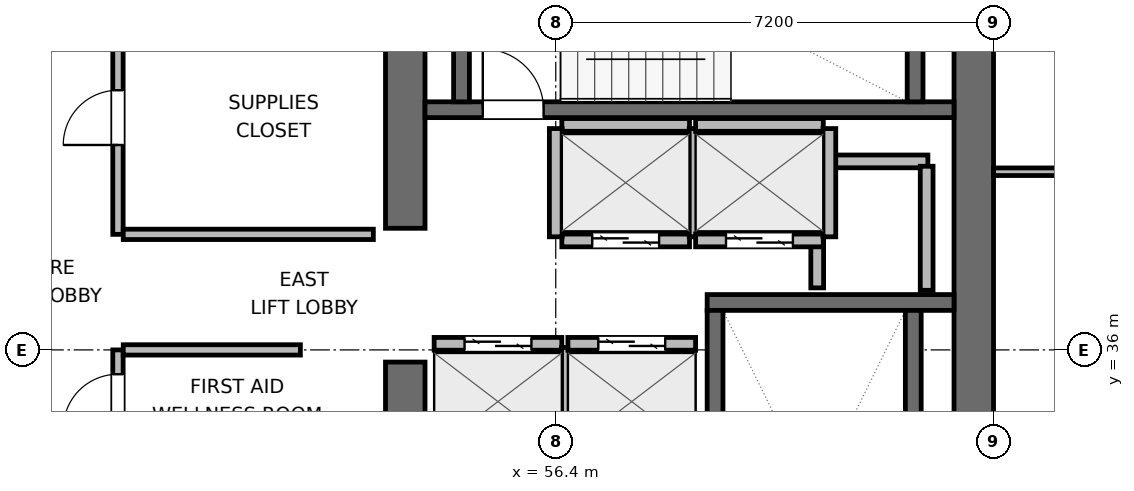
"""IFC4 building model, lengths in metres.
Left out: names, types, materials, properties, quantities, classifications, styles, units other than length and angle.
Written with IfcOpenShell. Run it as: python <this file> out.ifc"""

import sys

from ifc_helpers import new_model, si_unit, direction, frame, frame_2d, origin, place, context, subcontext, project, spatial, rectangle, extrude, element, fill, save


model = new_model("IFC4")
c1 = context("Model", 3, precision=1e-05, world=origin(), true_north=direction((0.0, 1.0)))
c2 = subcontext(c1, "Body", "Model", "MODEL_VIEW")
j1 = project(units=[si_unit("LENGTHUNIT", "METRE"), si_unit("PLANEANGLEUNIT", "RADIAN")], contexts=[c1])
p1 = place(None, origin())
s1 = spatial("IfcSite", under=j1, at=p1, CompositionType="ELEMENT")
p2 = place(p1, origin())
s2 = spatial("IfcBuilding", under=s1, at=p2, CompositionType="ELEMENT")
p3 = place(p2, frame((0.0, 0.0, 231.0)))
s3 = spatial("IfcBuildingStorey", under=s2, at=p3, CompositionType="ELEMENT", Elevation=231.0)
p4 = place(p3, frame((53.925, 27.925, 0.0), z_axis=(0.0, 0.0, 1.0), x_axis=(0.0, 1.0, 0.0)))
e1 = element("IfcWall", 1, at=p4, inside=s3, PredefinedType="SHEAR", context=c2, shape_type="SweptSolid", body=[
    extrude(rectangle(XDim=7.875, YDim=0.65, at=frame_2d((3.938, 0.0))), origin(), (0.0, 0.0, 1.0), 3.9),
])
p5 = place(p3, frame((53.925, 38.0, 0.0), z_axis=(0.0, 0.0, 1.0), x_axis=(0.0, 1.0, 0.0)))
e2 = element("IfcWall", 2, at=p5, inside=s3, PredefinedType="SHEAR", context=c2, shape_type="SweptSolid", body=[
    extrude(rectangle(XDim=6.075, YDim=0.65, at=frame_2d((3.038, 0.0))), origin(), (0.0, 0.0, 1.0), 3.9),
])
p6 = place(p3, frame((63.275, 27.6, 0.0), z_axis=(0.0, 0.0, 1.0), x_axis=(0.0, 1.0, 0.0)))
e3 = element("IfcWall", 3, at=p6, inside=s3, PredefinedType="SHEAR", context=c2, shape_type="SweptSolid", body=[
    extrude(rectangle(XDim=16.8, YDim=0.65, at=frame_2d((8.4, 0.0))), origin(), (0.0, 0.0, 1.0), 3.9),
])
p7 = place(p3, frame((58.89, 36.78, 0.0), z_axis=(0.0, 0.0, 1.0), x_axis=(1.0, 0.0, 0.0)))
e4 = element("IfcWall", 4, at=p7, inside=s3, PredefinedType="SHEAR", context=c2, shape_type="SweptSolid", body=[
    extrude(rectangle(XDim=4.06, YDim=0.26, at=frame_2d((2.03, 0.0))), origin(), (0.0, 0.0, 1.0), 3.9),
])
p8 = place(p3, frame((59.02, 29.05, 0.0), z_axis=(0.0, 0.0, 1.0), x_axis=(0.0, 1.0, 0.0)))
e5 = element("IfcWall", 5, at=p8, inside=s3, PredefinedType="SHEAR", context=c2, shape_type="SweptSolid", body=[
    extrude(rectangle(XDim=7.6, YDim=0.26, at=frame_2d((3.8, 0.0))), origin(), (0.0, 0.0, 1.0), 3.9),
])
p9 = place(p8, frame((0.3, 0.0, 0.0)))
e6 = element("IfcOpeningElement", 6, at=p9, cuts=e5, PredefinedType="OPENING", context=c2, shape_type="SweptSolid", body=[
    extrude(rectangle(XDim=1.0, YDim=2.04, at=frame_2d((0.5, 1.02))), frame((0.0, 0.14, 0.0), z_axis=(0.0, -1.0, 0.0), x_axis=(1.0, 0.0, 0.0)), (0.0, 0.0, 1.0), 0.28),
])
p10 = place(p3, frame((62.28, 29.05, 0.0), z_axis=(0.0, 0.0, 1.0), x_axis=(0.0, 1.0, 0.0)))
e7 = element("IfcWall", 7, at=p10, inside=s3, PredefinedType="SHEAR", context=c2, shape_type="SweptSolid", body=[
    extrude(rectangle(XDim=7.6, YDim=0.26, at=frame_2d((3.8, 0.0))), origin(), (0.0, 0.0, 1.0), 3.9),
])
p11 = place(p3, frame((54.25, 39.95, 0.0), z_axis=(0.0, 0.0, 1.0), x_axis=(1.0, 0.0, 0.0)))
e8 = element("IfcWall", 8, at=p11, inside=s3, PredefinedType="SHEAR", context=c2, shape_type="SweptSolid", body=[
    extrude(rectangle(XDim=8.7, YDim=0.26, at=frame_2d((4.35, 0.0))), origin(), (0.0, 0.0, 1.0), 3.9),
])
p12 = place(p11, frame((0.95, 0.0, 0.0)))
e9 = element("IfcOpeningElement", 9, at=p12, cuts=e8, PredefinedType="OPENING", context=c2, shape_type="SweptSolid", body=[
    extrude(rectangle(XDim=1.0, YDim=2.04, at=frame_2d((0.5, 1.02))), frame((0.0, 0.14, 0.0), z_axis=(0.0, -1.0, 0.0), x_axis=(1.0, 0.0, 0.0)), (0.0, 0.0, 1.0), 0.28),
])
for number, where, z_axis, x_axis in (
    (10, (54.85, 40.08, 0.0), (0.0, 0.0, 1.0), (0.0, 1.0, 0.0)),
    (11, (62.31, 40.08, 0.0), (0.0, 0.0, 1.0), (0.0, 1.0, 0.0)),
):
    element("IfcWall", number, at=place(p3, frame(where, z_axis=z_axis, x_axis=x_axis)), inside=s3, PredefinedType="SHEAR", context=c2, shape_type="SweptSolid", body=[
        extrude(rectangle(XDim=2.94, YDim=0.26, at=frame_2d((1.47, 0.0))), origin(), (0.0, 0.0, 1.0), 3.9),
    ])
p13 = place(p3, frame((60.72, 39.1, 0.0), z_axis=(0.0, 0.0, 1.0), x_axis=(1.0, 0.0, 0.0)))
e12 = element("IfcWall", 12, at=p13, inside=s3, PredefinedType="PARTITIONING", context=c2, shape_type="SweptSolid", body=[
    extrude(rectangle(XDim=1.8, YDim=0.21, at=frame_2d((0.9, 0.0))), origin(), (0.0, 0.0, 1.0), 3.68),
])
p14 = place(p3, frame((60.7, 37.02, 0.0), z_axis=(0.0, 0.0, 1.0), x_axis=(0.0, 1.0, 0.0)))
e13 = element("IfcWall", 13, at=p14, inside=s3, PredefinedType="PARTITIONING", context=c2, shape_type="SweptSolid", body=[
    extrude(rectangle(XDim=1.96, YDim=0.21, at=frame_2d((0.98, 0.0))), origin(), (0.0, 0.0, 1.0), 3.68),
])
p15 = place(p3, frame((62.5, 36.98, 0.0), z_axis=(0.0, 0.0, 1.0), x_axis=(0.0, 1.0, 0.0)))
e14 = element("IfcWall", 14, at=p15, inside=s3, PredefinedType="PARTITIONING", context=c2, shape_type="SweptSolid", body=[
    extrude(rectangle(XDim=2.04, YDim=0.21, at=frame_2d((1.02, 0.0))), origin(), (0.0, 0.0, 1.0), 3.68),
])
p16 = place(p3, frame((54.4, 36.1, 0.0), z_axis=(0.0, 0.0, 1.0), x_axis=(1.0, 0.0, 0.0)))
e15 = element("IfcWall", 15, at=p16, inside=s3, PredefinedType="PARTITIONING", context=c2, shape_type="SweptSolid", body=[
    extrude(rectangle(XDim=2.1, YDim=0.21, at=frame_2d((1.05, 0.0))), origin(), (0.0, 0.0, 1.0), 3.68),
])
p17 = place(p16, frame((0.5, 0.0, 0.0)))
e16 = element("IfcOpeningElement", 16, at=p17, cuts=e15, PredefinedType="OPENING", context=c2, shape_type="SweptSolid", body=[
    extrude(rectangle(XDim=1.1, YDim=2.04, at=frame_2d((0.55, 1.02))), frame((0.0, 0.115, 0.0), z_axis=(0.0, -1.0, 0.0), x_axis=(1.0, 0.0, 0.0)), (0.0, 0.0, 1.0), 0.23),
])
p18 = place(p3, frame((56.6, 34.26, 0.0), z_axis=(0.0, 0.0, 1.0), x_axis=(0.0, 1.0, 0.0)))
e17 = element("IfcWall", 17, at=p18, inside=s3, PredefinedType="PARTITIONING", context=c2, shape_type="SweptSolid", body=[
    extrude(rectangle(XDim=1.78, YDim=0.21, at=frame_2d((0.89, 0.0))), origin(), (0.0, 0.0, 1.0), 3.68),
])
p19 = place(p3, frame((56.6, 36.1, 0.0), z_axis=(0.0, 0.0, 1.0), x_axis=(1.0, 0.0, 0.0)))
e18 = element("IfcWall", 18, at=p19, inside=s3, PredefinedType="PARTITIONING", context=c2, shape_type="SweptSolid", body=[
    extrude(rectangle(XDim=2.1, YDim=0.21, at=frame_2d((1.05, 0.0))), origin(), (0.0, 0.0, 1.0), 3.68),
])
p20 = place(p19, frame((0.5, 0.0, 0.0)))
e19 = element("IfcOpeningElement", 19, at=p20, cuts=e18, PredefinedType="OPENING", context=c2, shape_type="SweptSolid", body=[
    extrude(rectangle(XDim=1.1, YDim=2.04, at=frame_2d((0.55, 1.02))), frame((0.0, 0.115, 0.0), z_axis=(0.0, -1.0, 0.0), x_axis=(1.0, 0.0, 0.0)), (0.0, 0.0, 1.0), 0.23),
])
p21 = place(p3, frame((56.5, 37.8, 0.0), z_axis=(0.0, 0.0, 1.0), x_axis=(1.0, 0.0, 0.0)))
e20 = element("IfcWall", 20, at=p21, inside=s3, PredefinedType="PARTITIONING", context=c2, shape_type="SweptSolid", body=[
    extrude(rectangle(XDim=2.1, YDim=0.21, at=frame_2d((1.05, 0.0))), origin(), (0.0, 0.0, 1.0), 3.68),
])
p22 = place(p21, frame((0.5, 0.0, 0.0)))
e21 = element("IfcOpeningElement", 21, at=p22, cuts=e20, PredefinedType="OPENING", context=c2, shape_type="SweptSolid", body=[
    extrude(rectangle(XDim=1.1, YDim=2.04, at=frame_2d((0.55, 1.02))), frame((0.0, 0.115, 0.0), z_axis=(0.0, -1.0, 0.0), x_axis=(1.0, 0.0, 0.0)), (0.0, 0.0, 1.0), 0.23),
])
p23 = place(p3, frame((56.5, 39.7, 0.0), z_axis=(0.0, 0.0, 1.0), x_axis=(1.0, 0.0, 0.0)))
e22 = element("IfcWall", 22, at=p23, inside=s3, PredefinedType="PARTITIONING", context=c2, shape_type="SweptSolid", body=[
    extrude(rectangle(XDim=2.1, YDim=0.21, at=frame_2d((1.05, 0.0))), origin(), (0.0, 0.0, 1.0), 3.68),
])
for number, where, z_axis, x_axis in (
    (23, (56.4, 37.86, 0.0), (0.0, 0.0, 1.0), (0.0, 1.0, 0.0)),
    (24, (58.7, 37.86, 0.0), (0.0, 0.0, 1.0), (0.0, 1.0, 0.0)),
):
    element("IfcWall", number, at=place(p3, frame(where, z_axis=z_axis, x_axis=x_axis)), inside=s3, PredefinedType="PARTITIONING", context=c2, shape_type="SweptSolid", body=[
        extrude(rectangle(XDim=1.78, YDim=0.21, at=frame_2d((0.89, 0.0))), origin(), (0.0, 0.0, 1.0), 3.68),
    ])
p24 = place(p3, frame((58.7, 37.8, 0.0), z_axis=(0.0, 0.0, 1.0), x_axis=(1.0, 0.0, 0.0)))
e25 = element("IfcWall", 25, at=p24, inside=s3, PredefinedType="PARTITIONING", context=c2, shape_type="SweptSolid", body=[
    extrude(rectangle(XDim=2.1, YDim=0.21, at=frame_2d((1.05, 0.0))), origin(), (0.0, 0.0, 1.0), 3.68),
])
p25 = place(p24, frame((0.5, 0.0, 0.0)))
e26 = element("IfcOpeningElement", 26, at=p25, cuts=e25, PredefinedType="OPENING", context=c2, shape_type="SweptSolid", body=[
    extrude(rectangle(XDim=1.1, YDim=2.04, at=frame_2d((0.55, 1.02))), frame((0.0, 0.115, 0.0), z_axis=(0.0, -1.0, 0.0), x_axis=(1.0, 0.0, 0.0)), (0.0, 0.0, 1.0), 0.23),
])
p26 = place(p3, frame((58.7, 39.7, 0.0), z_axis=(0.0, 0.0, 1.0), x_axis=(1.0, 0.0, 0.0)))
e27 = element("IfcWall", 27, at=p26, inside=s3, PredefinedType="PARTITIONING", context=c2, shape_type="SweptSolid", body=[
    extrude(rectangle(XDim=2.1, YDim=0.21, at=frame_2d((1.05, 0.0))), origin(), (0.0, 0.0, 1.0), 3.68),
])
p27 = place(p3, frame((60.9, 37.86, 0.0), z_axis=(0.0, 0.0, 1.0), x_axis=(0.0, 1.0, 0.0)))
e28 = element("IfcWall", 28, at=p27, inside=s3, PredefinedType="PARTITIONING", context=c2, shape_type="SweptSolid", body=[
    extrude(rectangle(XDim=1.78, YDim=0.21, at=frame_2d((0.89, 0.0))), origin(), (0.0, 0.0, 1.0), 3.68),
])
p28 = place(p3, frame((49.2, 32.6, 0.0), z_axis=(0.0, 0.0, 1.0), x_axis=(0.0, 1.0, 0.0)))
e29 = element("IfcWall", 29, at=p28, inside=s3, PredefinedType="PARTITIONING", context=c2, shape_type="SweptSolid", body=[
    extrude(rectangle(XDim=3.4, YDim=0.17, at=frame_2d((1.7, 0.0))), origin(), (0.0, 0.0, 1.0), 3.68),
])
p29 = place(p28, frame((0.4, 0.0, 0.0)))
e30 = element("IfcOpeningElement", 30, at=p29, cuts=e29, PredefinedType="OPENING", context=c2, shape_type="SweptSolid", body=[
    extrude(rectangle(XDim=0.9, YDim=2.02, at=frame_2d((0.45, 1.01))), frame((0.0, 0.095, 0.0), z_axis=(0.0, -1.0, 0.0), x_axis=(1.0, 0.0, 0.0)), (0.0, 0.0, 1.0), 0.19),
])
p30 = place(p28, frame((2.1, 0.0, 0.0)))
e31 = element("IfcOpeningElement", 31, at=p30, cuts=e29, PredefinedType="OPENING", context=c2, shape_type="SweptSolid", body=[
    extrude(rectangle(XDim=0.9, YDim=2.02, at=frame_2d((0.45, 1.01))), frame((0.0, 0.095, 0.0), z_axis=(0.0, -1.0, 0.0), x_axis=(1.0, 0.0, 0.0)), (0.0, 0.0, 1.0), 0.19),
])
p31 = place(p3, frame((49.287, 36.0, 0.0), z_axis=(0.0, 0.0, 1.0), x_axis=(1.0, 0.0, 0.0)))
e32 = element("IfcWall", 32, at=p31, inside=s3, PredefinedType="PARTITIONING", context=c2, shape_type="SweptSolid", body=[
    extrude(rectangle(XDim=2.913, YDim=0.17, at=frame_2d((1.457, 0.0))), origin(), (0.0, 0.0, 1.0), 3.68),
])
p32 = place(p3, frame((49.2, 37.9, 0.0), z_axis=(0.0, 0.0, 1.0), x_axis=(0.0, 1.0, 0.0)))
e33 = element("IfcWall", 33, at=p32, inside=s3, PredefinedType="PARTITIONING", context=c2, shape_type="SweptSolid", body=[
    extrude(rectangle(XDim=6.0, YDim=0.17, at=frame_2d((3.0, 0.0))), origin(), (0.0, 0.0, 1.0), 3.68),
])
p33 = place(p32, frame((1.47, 0.0, 0.0)))
e34 = element("IfcOpeningElement", 34, at=p33, cuts=e33, PredefinedType="OPENING", context=c2, shape_type="SweptSolid", body=[
    extrude(rectangle(XDim=0.9, YDim=2.02, at=frame_2d((0.45, 1.01))), frame((0.0, 0.095, 0.0), z_axis=(0.0, -1.0, 0.0), x_axis=(1.0, 0.0, 0.0)), (0.0, 0.0, 1.0), 0.19),
])
p34 = place(p32, frame((4.47, 0.0, 0.0)))
e35 = element("IfcOpeningElement", 35, at=p34, cuts=e33, PredefinedType="OPENING", context=c2, shape_type="SweptSolid", body=[
    extrude(rectangle(XDim=0.9, YDim=2.02, at=frame_2d((0.45, 1.01))), frame((0.0, 0.095, 0.0), z_axis=(0.0, -1.0, 0.0), x_axis=(1.0, 0.0, 0.0)), (0.0, 0.0, 1.0), 0.19),
])
p35 = place(p3, frame((49.287, 37.9, 0.0), z_axis=(0.0, 0.0, 1.0), x_axis=(1.0, 0.0, 0.0)))
e36 = element("IfcWall", 36, at=p35, inside=s3, PredefinedType="PARTITIONING", context=c2, shape_type="SweptSolid", body=[
    extrude(rectangle(XDim=4.113, YDim=0.17, at=frame_2d((2.056, 0.0))), origin(), (0.0, 0.0, 1.0), 3.68),
])
p36 = place(p3, frame((63.6, 38.93, 0.0), z_axis=(0.0, 0.0, 1.0), x_axis=(1.0, 0.0, 0.0)))
e37 = element("IfcWall", 37, at=p36, inside=s3, PredefinedType="PARTITIONING", context=c2, shape_type="SweptSolid", body=[
    extrude(rectangle(XDim=4.845, YDim=0.125, at=frame_2d((2.422, 0.0))), origin(), (0.0, 0.0, 1.0), 3.68),
])
p37 = place(p36, frame((2.1, 0.0, 0.0)))
e38 = element("IfcOpeningElement", 38, at=p37, cuts=e37, PredefinedType="OPENING", context=c2, shape_type="SweptSolid", body=[
    extrude(rectangle(XDim=0.9, YDim=2.02, at=frame_2d((0.45, 1.01))), frame((0.0, 0.073, 0.0), z_axis=(0.0, -1.0, 0.0), x_axis=(1.0, 0.0, 0.0)), (0.0, 0.0, 1.0), 0.145),
])
p38 = place(p12, origin())
e39 = element("IfcDoor", 39, at=p38, inside=s3, OperationType="SINGLE_SWING_LEFT", PredefinedType="DOOR", context=c2, shape_type="SweptSolid", body=[
    extrude(rectangle(XDim=1.0, YDim=2.04, at=frame_2d((0.5, 1.02))), frame((0.0, 0.025, 0.0), z_axis=(0.0, -1.0, 0.0), x_axis=(1.0, 0.0, 0.0)), (0.0, 0.0, 1.0), 0.05),
])
fill(e9, e39)
p39 = place(p17, origin())
e40 = element("IfcDoor", 40, at=p39, inside=s3, OperationType="DOUBLE_DOOR_SLIDING", PredefinedType="DOOR", context=c2, shape_type="SweptSolid", body=[
    extrude(rectangle(XDim=1.1, YDim=2.04, at=frame_2d((0.55, 1.02))), frame((0.0, 0.025, 0.0), z_axis=(0.0, -1.0, 0.0), x_axis=(1.0, 0.0, 0.0)), (0.0, 0.0, 1.0), 0.05),
])
fill(e16, e40)
p40 = place(p20, origin())
e41 = element("IfcDoor", 41, at=p40, inside=s3, OperationType="DOUBLE_DOOR_SLIDING", PredefinedType="DOOR", context=c2, shape_type="SweptSolid", body=[
    extrude(rectangle(XDim=1.1, YDim=2.04, at=frame_2d((0.55, 1.02))), frame((0.0, 0.025, 0.0), z_axis=(0.0, -1.0, 0.0), x_axis=(1.0, 0.0, 0.0)), (0.0, 0.0, 1.0), 0.05),
])
fill(e19, e41)
p41 = place(p22, origin())
e42 = element("IfcDoor", 42, at=p41, inside=s3, OperationType="DOUBLE_DOOR_SLIDING", PredefinedType="DOOR", context=c2, shape_type="SweptSolid", body=[
    extrude(rectangle(XDim=1.1, YDim=2.04, at=frame_2d((0.55, 1.02))), frame((0.0, 0.025, 0.0), z_axis=(0.0, -1.0, 0.0), x_axis=(1.0, 0.0, 0.0)), (0.0, 0.0, 1.0), 0.05),
])
fill(e21, e42)
p42 = place(p25, origin())
e43 = element("IfcDoor", 43, at=p42, inside=s3, OperationType="DOUBLE_DOOR_SLIDING", PredefinedType="DOOR", context=c2, shape_type="SweptSolid", body=[
    extrude(rectangle(XDim=1.1, YDim=2.04, at=frame_2d((0.55, 1.02))), frame((0.0, 0.025, 0.0), z_axis=(0.0, -1.0, 0.0), x_axis=(1.0, 0.0, 0.0)), (0.0, 0.0, 1.0), 0.05),
])
fill(e26, e43)
p43 = place(p30, origin())
e44 = element("IfcDoor", 44, at=p43, inside=s3, OperationType="SINGLE_SWING_LEFT", PredefinedType="DOOR", context=c2, shape_type="SweptSolid", body=[
    extrude(rectangle(XDim=0.9, YDim=2.02, at=frame_2d((0.45, 1.01))), frame((0.0, 0.025, 0.0), z_axis=(0.0, -1.0, 0.0), x_axis=(1.0, 0.0, 0.0)), (0.0, 0.0, 1.0), 0.05),
])
fill(e31, e44)
p44 = place(p33, origin())
e45 = element("IfcDoor", 45, at=p44, inside=s3, OperationType="SINGLE_SWING_LEFT", PredefinedType="DOOR", context=c2, shape_type="SweptSolid", body=[
    extrude(rectangle(XDim=0.9, YDim=2.02, at=frame_2d((0.45, 1.01))), frame((0.0, 0.025, 0.0), z_axis=(0.0, -1.0, 0.0), x_axis=(1.0, 0.0, 0.0)), (0.0, 0.0, 1.0), 0.05),
])
fill(e34, e45)
save(model, sys.argv[1])
